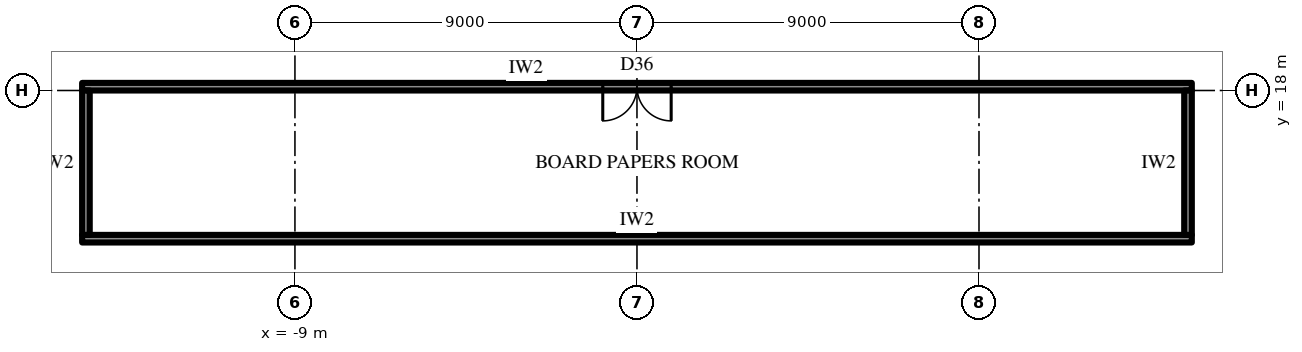
"""IFC4 building model, lengths in metres.
Left out: names, types, materials, properties, quantities, classifications, styles, units other than length and angle.
Written with IfcOpenShell. Run it as: python <this file> out.ifc"""

import sys

from ifc_helpers import new_model, si_unit, direction, frame, frame_2d, origin, place, context, subcontext, project, spatial, rectangle, extrude, element, fill, save


model = new_model("IFC4")
c1 = context("Model", 3, precision=1e-05, world=origin(), true_north=direction((0.0, 1.0)))
c2 = subcontext(c1, "Body", "Model", "MODEL_VIEW")
j1 = project(units=[si_unit("LENGTHUNIT", "METRE"), si_unit("PLANEANGLEUNIT", "RADIAN")], contexts=[c1])
p1 = place(None, origin())
s1 = spatial("IfcSite", under=j1, at=p1, CompositionType="ELEMENT")
p2 = place(p1, origin())
s2 = spatial("IfcBuilding", under=s1, at=p2, CompositionType="ELEMENT")
p3 = place(p2, frame((0.0, 0.0, 249.1)))
s3 = spatial("IfcBuildingStorey", under=s2, at=p3, CompositionType="ELEMENT", Elevation=249.1)
p4 = place(p3, frame((-14.6, 14.1, 0.0), z_axis=(0.0, 0.0, 1.0), x_axis=(1.0, 0.0, 0.0)))
e1 = element("IfcWall", 1, at=p4, inside=s3, PredefinedType="PARTITIONING", context=c2, shape_type="SweptSolid", body=[
    extrude(rectangle(XDim=29.2, YDim=0.2, at=frame_2d((14.6, 0.0))), origin(), (0.0, 0.0, 1.0), 4.0),
])
p5 = place(p3, frame((-14.6, 18.1, 0.0), z_axis=(0.0, 0.0, 1.0), x_axis=(1.0, 0.0, 0.0)))
e2 = element("IfcWall", 2, at=p5, inside=s3, PredefinedType="PARTITIONING", context=c2, shape_type="SweptSolid", body=[
    extrude(rectangle(XDim=29.2, YDim=0.2, at=frame_2d((14.6, 0.0))), origin(), (0.0, 0.0, 1.0), 4.0),
])
p6 = place(p5, frame((13.7, 0.0, 0.0)))
e3 = element("IfcOpeningElement", 3, at=p6, cuts=e2, PredefinedType="OPENING", context=c2, shape_type="SweptSolid", body=[
    extrude(rectangle(XDim=1.8, YDim=2.4, at=frame_2d((0.9, 1.2))), frame((0.0, 0.11, 0.0), z_axis=(0.0, -1.0, 0.0), x_axis=(1.0, 0.0, 0.0)), (0.0, 0.0, 1.0), 0.22),
])
for number, where, z_axis, x_axis in (
    (4, (-14.5, 14.2, 0.0), (0.0, 0.0, 1.0), (0.0, 1.0, 0.0)),
    (5, (14.5, 14.2, 0.0), (0.0, 0.0, 1.0), (0.0, 1.0, 0.0)),
):
    element("IfcWall", number, at=place(p3, frame(where, z_axis=z_axis, x_axis=x_axis)), inside=s3, PredefinedType="PARTITIONING", context=c2, shape_type="SweptSolid", body=[
        extrude(rectangle(XDim=3.8, YDim=0.2, at=frame_2d((1.9, 0.0))), origin(), (0.0, 0.0, 1.0), 4.0),
    ])
p7 = place(p6, frame((1.8, 0.0, 0.0), z_axis=(0.0, 0.0, 1.0), x_axis=(-1.0, 0.0, 0.0)))
e6 = element("IfcDoor", 6, at=p7, inside=s3, OperationType="DOUBLE_DOOR_SINGLE_SWING", PredefinedType="DOOR", context=c2, shape_type="SweptSolid", body=[
    extrude(rectangle(XDim=1.8, YDim=2.4, at=frame_2d((0.9, 1.2))), frame((0.0, 0.025, 0.0), z_axis=(0.0, -1.0, 0.0), x_axis=(1.0, 0.0, 0.0)), (0.0, 0.0, 1.0), 0.05),
])
fill(e3, e6)
save(model, sys.argv[1])
